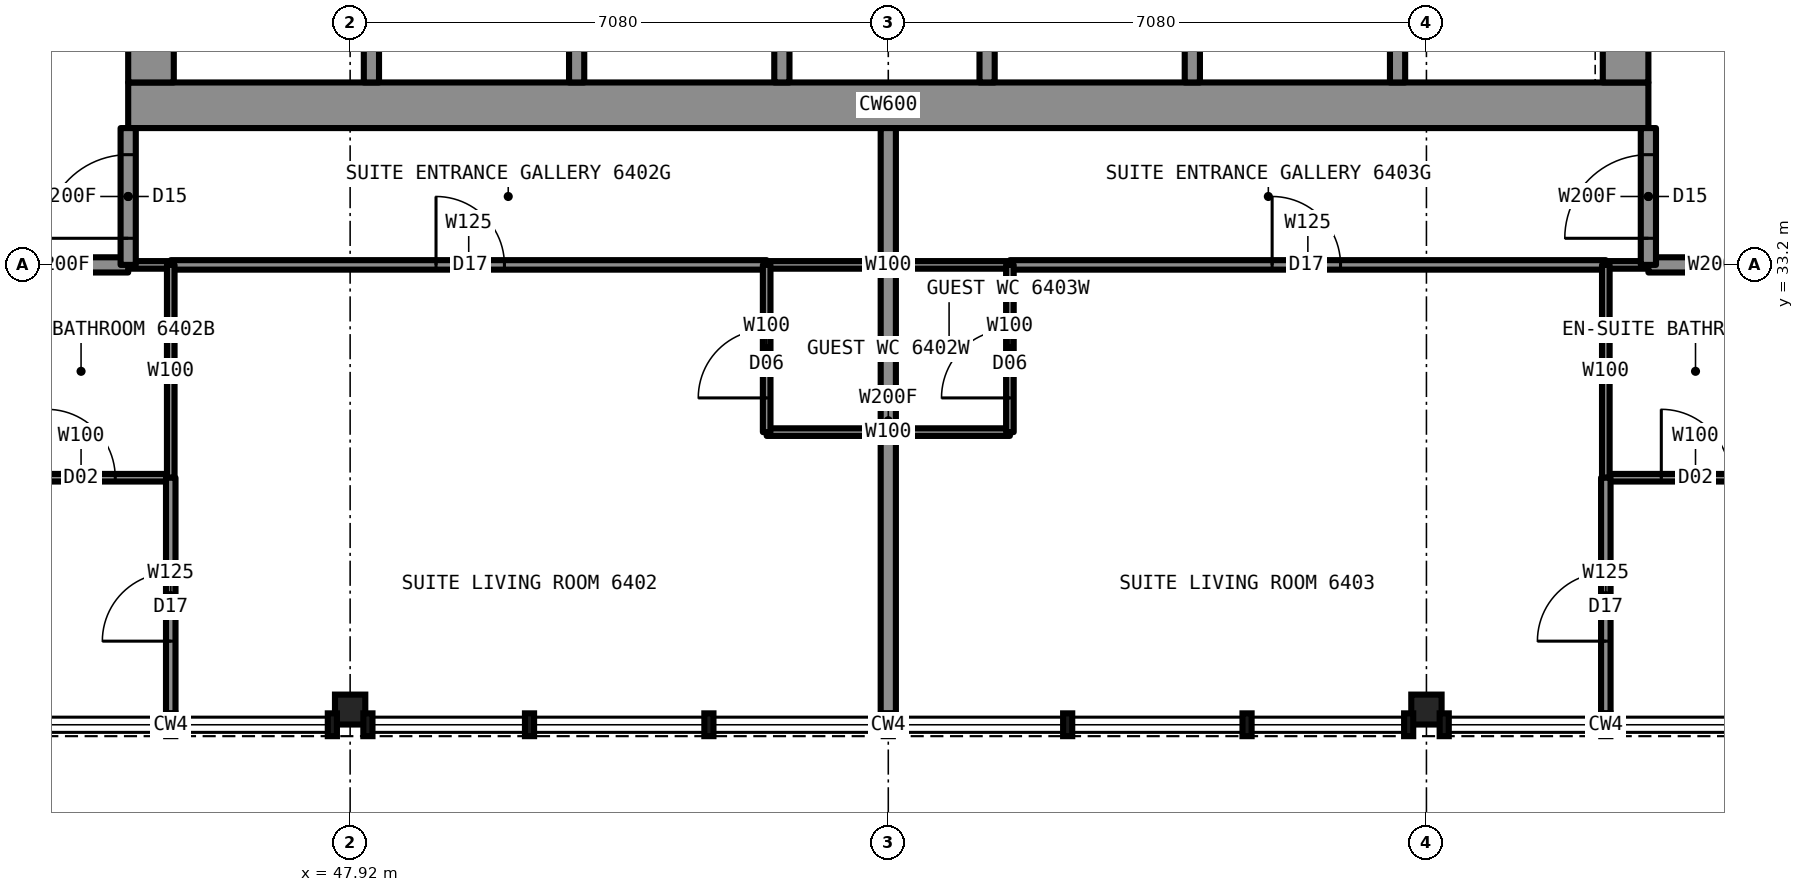
"""IFC4 building model, lengths in metres.
Left out: names, types, materials, properties, quantities, classifications, styles, units other than length and angle.
Written with IfcOpenShell. Run it as: python <this file> out.ifc"""

import sys

from ifc_helpers import new_model, si_unit, direction, frame, frame_2d, origin, origin_2d, place, context, subcontext, project, spatial, rectangle, i_section, extrude, element, fill, save


model = new_model("IFC4")
c1 = context("Model", 3, precision=1e-05, world=origin(), true_north=direction((0.0, 1.0)))
c2 = subcontext(c1, "Body", "Model", "MODEL_VIEW")
j1 = project(units=[si_unit("LENGTHUNIT", "METRE"), si_unit("PLANEANGLEUNIT", "RADIAN")], contexts=[c1])
p1 = place(None, origin())
s1 = spatial("IfcSite", under=j1, at=p1, CompositionType="ELEMENT")
p2 = place(p1, origin())
s2 = spatial("IfcBuilding", under=s1, at=p2, CompositionType="ELEMENT")
p3 = place(p2, frame((0.0, 0.0, 237.2)))
s3 = spatial("IfcBuildingStorey", under=s2, at=p3, CompositionType="ELEMENT", Elevation=237.2)
for number, where, z_axis, x_axis in (
    (1, (47.92, 27.35, 0.0), (0.0, 0.0, 1.0), (1.0, 0.0, 0.0)),
    (2, (62.08, 27.35, 0.0), (0.0, 0.0, 1.0), (1.0, 0.0, 0.0)),
):
    element("IfcColumn", number, at=place(p3, frame(where, z_axis=z_axis, x_axis=x_axis)), inside=s3, PredefinedType="COLUMN", context=c2, shape_type="SweptSolid", body=[
        extrude(i_section(OverallWidth=0.399, OverallDepth=0.394, WebThickness=0.023, FlangeThickness=0.037, at=origin_2d()), origin(), (0.0, 0.0, 1.0), 3.5),
    ])
p4 = place(p3, frame((45.0, 35.3, 0.0), z_axis=(0.0, 0.0, 1.0), x_axis=(1.0, 0.0, 0.0)))
e3 = element("IfcWall", 3, at=p4, inside=s3, PredefinedType="SHEAR", context=c2, shape_type="SweptSolid", body=[
    extrude(rectangle(XDim=20.0, YDim=0.6, at=frame_2d((10.0, 0.0))), origin(), (0.0, 0.0, 1.0), 3.5),
])
p5 = place(p3, frame((64.7, 35.6, 0.0), z_axis=(0.0, 0.0, 1.0), x_axis=(0.0, 1.0, 0.0)))
e4 = element("IfcWall", 4, at=p5, inside=s3, PredefinedType="SHEAR", context=c2, shape_type="SweptSolid", body=[
    extrude(rectangle(XDim=18.8, YDim=0.6, at=frame_2d((9.4, 0.0))), origin(), (0.0, 0.0, 1.0), 3.5),
])
p6 = place(p5, frame((13.4, 0.0, 0.0)))
e5 = element("IfcOpeningElement", 5, at=p6, cuts=e4, PredefinedType="OPENING", context=c2, shape_type="SweptSolid", body=[
    extrude(rectangle(XDim=1.8, YDim=2.2, at=frame_2d((0.9, 1.1))), frame((0.0, 0.31, 0.0), z_axis=(0.0, -1.0, 0.0), x_axis=(1.0, 0.0, 0.0)), (0.0, 0.0, 1.0), 0.62),
])
p7 = place(p5, frame((3.6, 0.0, 0.0)))
e6 = element("IfcOpeningElement", 6, at=p7, cuts=e4, PredefinedType="OPENING", context=c2, shape_type="SweptSolid", body=[
    extrude(rectangle(XDim=1.8, YDim=2.2, at=frame_2d((0.9, 1.1))), frame((0.0, 0.31, 0.0), z_axis=(0.0, -1.0, 0.0), x_axis=(1.0, 0.0, 0.0)), (0.0, 0.0, 1.0), 0.62),
])
p8 = place(p3, frame((45.3, 35.6, 0.0), z_axis=(0.0, 0.0, 1.0), x_axis=(0.0, 1.0, 0.0)))
e7 = element("IfcWall", 7, at=p8, inside=s3, PredefinedType="SHEAR", context=c2, shape_type="SweptSolid", body=[
    extrude(rectangle(XDim=18.8, YDim=0.6, at=frame_2d((9.4, 0.0))), origin(), (0.0, 0.0, 1.0), 3.5),
])
p9 = place(p8, frame((13.4, 0.0, 0.0)))
e8 = element("IfcOpeningElement", 8, at=p9, cuts=e7, PredefinedType="OPENING", context=c2, shape_type="SweptSolid", body=[
    extrude(rectangle(XDim=1.8, YDim=2.2, at=frame_2d((0.9, 1.1))), frame((0.0, 0.31, 0.0), z_axis=(0.0, -1.0, 0.0), x_axis=(1.0, 0.0, 0.0)), (0.0, 0.0, 1.0), 0.62),
])
p10 = place(p8, frame((3.6, 0.0, 0.0)))
e9 = element("IfcOpeningElement", 9, at=p10, cuts=e7, PredefinedType="OPENING", context=c2, shape_type="SweptSolid", body=[
    extrude(rectangle(XDim=1.8, YDim=2.2, at=frame_2d((0.9, 1.1))), frame((0.0, 0.31, 0.0), z_axis=(0.0, -1.0, 0.0), x_axis=(1.0, 0.0, 0.0)), (0.0, 0.0, 1.0), 0.62),
])
p11 = place(p8, frame((6.4, 0.0, 0.0)))
e10 = element("IfcOpeningElement", 10, at=p11, cuts=e7, PredefinedType="OPENING", context=c2, shape_type="SweptSolid", body=[
    extrude(rectangle(XDim=1.2, YDim=2.2, at=frame_2d((0.6, 1.1))), frame((0.0, 0.31, 0.0), z_axis=(0.0, -1.0, 0.0), x_axis=(1.0, 0.0, 0.0)), (0.0, 0.0, 1.0), 0.62),
])
p12 = place(p3, frame((45.0, 33.2, 0.0), z_axis=(0.0, 0.0, 1.0), x_axis=(1.0, 0.0, 0.0)))
e11 = element("IfcWall", 11, at=p12, inside=s3, PredefinedType="PARTITIONING", context=c2, shape_type="SweptSolid", body=[
    extrude(rectangle(XDim=0.56, YDim=0.1, at=frame_2d((0.28, 0.0))), origin(), (0.0, 0.0, 1.0), 3.33),
])
p13 = place(p3, frame((53.4, 33.2, 0.0), z_axis=(0.0, 0.0, 1.0), x_axis=(1.0, 0.0, 0.0)))
e12 = element("IfcWall", 12, at=p13, inside=s3, PredefinedType="PARTITIONING", context=c2, shape_type="SweptSolid", body=[
    extrude(rectangle(XDim=3.2, YDim=0.1, at=frame_2d((1.6, 0.0))), origin(), (0.0, 0.0, 1.0), 3.33),
])
p14 = place(p3, frame((64.44, 33.2, 0.0), z_axis=(0.0, 0.0, 1.0), x_axis=(1.0, 0.0, 0.0)))
e13 = element("IfcWall", 13, at=p14, inside=s3, PredefinedType="PARTITIONING", context=c2, shape_type="SweptSolid", body=[
    extrude(rectangle(XDim=0.56, YDim=0.1, at=frame_2d((0.28, 0.0))), origin(), (0.0, 0.0, 1.0), 3.33),
])
p15 = place(p3, frame((43.22, 33.2, 0.0), z_axis=(0.0, 0.0, 1.0), x_axis=(1.0, 0.0, 0.0)))
e14 = element("IfcWall", 14, at=p15, inside=s3, PredefinedType="PARTITIONING", context=c2, shape_type="SweptSolid", body=[
    extrude(rectangle(XDim=1.78, YDim=0.2, at=frame_2d((0.89, 0.0))), origin(), (0.0, 0.0, 1.0), 3.33),
])
p16 = place(p3, frame((65.0, 33.2, 0.0), z_axis=(0.0, 0.0, 1.0), x_axis=(1.0, 0.0, 0.0)))
e15 = element("IfcWall", 15, at=p16, inside=s3, PredefinedType="PARTITIONING", context=c2, shape_type="SweptSolid", body=[
    extrude(rectangle(XDim=1.8, YDim=0.2, at=frame_2d((0.9, 0.0))), origin(), (0.0, 0.0, 1.0), 3.33),
])
p17 = place(p3, frame((45.56, 33.2, 0.0), z_axis=(0.0, 0.0, 1.0), x_axis=(1.0, 0.0, 0.0)))
e16 = element("IfcWall", 16, at=p17, inside=s3, PredefinedType="PARTITIONING", context=c2, shape_type="SweptSolid", body=[
    extrude(rectangle(XDim=7.84, YDim=0.125, at=frame_2d((3.92, 0.0))), origin(), (0.0, 0.0, 1.0), 3.33),
])
p18 = place(p17, frame((3.49, 0.0, 0.0)))
e17 = element("IfcOpeningElement", 17, at=p18, cuts=e16, PredefinedType="OPENING", context=c2, shape_type="SweptSolid", body=[
    extrude(rectangle(XDim=0.9, YDim=2.2, at=frame_2d((0.45, 1.1))), frame((0.0, 0.073, 0.0), z_axis=(0.0, -1.0, 0.0), x_axis=(1.0, 0.0, 0.0)), (0.0, 0.0, 1.0), 0.145),
])
p19 = place(p3, frame((56.6, 33.2, 0.0), z_axis=(0.0, 0.0, 1.0), x_axis=(1.0, 0.0, 0.0)))
e18 = element("IfcWall", 18, at=p19, inside=s3, PredefinedType="PARTITIONING", context=c2, shape_type="SweptSolid", body=[
    extrude(rectangle(XDim=7.84, YDim=0.125, at=frame_2d((3.92, 0.0))), origin(), (0.0, 0.0, 1.0), 3.33),
])
p20 = place(p19, frame((3.45, 0.0, 0.0)))
e19 = element("IfcOpeningElement", 19, at=p20, cuts=e18, PredefinedType="OPENING", context=c2, shape_type="SweptSolid", body=[
    extrude(rectangle(XDim=0.9, YDim=2.2, at=frame_2d((0.45, 1.1))), frame((0.0, 0.073, 0.0), z_axis=(0.0, -1.0, 0.0), x_axis=(1.0, 0.0, 0.0)), (0.0, 0.0, 1.0), 0.145),
])
p21 = place(p3, frame((53.4, 31.0, 0.0), z_axis=(0.0, 0.0, 1.0), x_axis=(1.0, 0.0, 0.0)))
e20 = element("IfcWall", 20, at=p21, inside=s3, PredefinedType="PARTITIONING", context=c2, shape_type="SweptSolid", body=[
    extrude(rectangle(XDim=3.2, YDim=0.1, at=frame_2d((1.6, 0.0))), origin(), (0.0, 0.0, 1.0), 3.33),
])
p22 = place(p3, frame((43.2, 30.4, 0.0), z_axis=(0.0, 0.0, 1.0), x_axis=(1.0, 0.0, 0.0)))
e21 = element("IfcWall", 21, at=p22, inside=s3, PredefinedType="PARTITIONING", context=c2, shape_type="SweptSolid", body=[
    extrude(rectangle(XDim=2.36, YDim=0.1, at=frame_2d((1.18, 0.0))), origin(), (0.0, 0.0, 1.0), 3.33),
])
p23 = place(p22, frame((0.73, 0.0, 0.0)))
e22 = element("IfcOpeningElement", 22, at=p23, cuts=e21, PredefinedType="OPENING", context=c2, shape_type="SweptSolid", body=[
    extrude(rectangle(XDim=0.9, YDim=2.1, at=frame_2d((0.45, 1.05))), frame((0.0, 0.06, 0.0), z_axis=(0.0, -1.0, 0.0), x_axis=(1.0, 0.0, 0.0)), (0.0, 0.0, 1.0), 0.12),
])
p24 = place(p3, frame((64.44, 30.4, 0.0), z_axis=(0.0, 0.0, 1.0), x_axis=(1.0, 0.0, 0.0)))
e23 = element("IfcWall", 23, at=p24, inside=s3, PredefinedType="PARTITIONING", context=c2, shape_type="SweptSolid", body=[
    extrude(rectangle(XDim=2.36, YDim=0.1, at=frame_2d((1.18, 0.0))), origin(), (0.0, 0.0, 1.0), 3.33),
])
p25 = place(p24, frame((0.73, 0.0, 0.0)))
e24 = element("IfcOpeningElement", 24, at=p25, cuts=e23, PredefinedType="OPENING", context=c2, shape_type="SweptSolid", body=[
    extrude(rectangle(XDim=0.9, YDim=2.1, at=frame_2d((0.45, 1.05))), frame((0.0, 0.06, 0.0), z_axis=(0.0, -1.0, 0.0), x_axis=(1.0, 0.0, 0.0)), (0.0, 0.0, 1.0), 0.12),
])
p26 = place(p3, frame((53.4, 31.0, 0.0), z_axis=(0.0, 0.0, 1.0), x_axis=(0.0, 1.0, 0.0)))
e25 = element("IfcWall", 25, at=p26, inside=s3, PredefinedType="PARTITIONING", context=c2, shape_type="SweptSolid", body=[
    extrude(rectangle(XDim=2.2, YDim=0.1, at=frame_2d((1.1, 0.0))), origin(), (0.0, 0.0, 1.0), 3.33),
])
p27 = place(p26, frame((0.45, 0.0, 0.0)))
e26 = element("IfcOpeningElement", 26, at=p27, cuts=e25, PredefinedType="OPENING", context=c2, shape_type="SweptSolid", body=[
    extrude(rectangle(XDim=0.9, YDim=2.1, at=frame_2d((0.45, 1.05))), frame((0.0, 0.06, 0.0), z_axis=(0.0, -1.0, 0.0), x_axis=(1.0, 0.0, 0.0)), (0.0, 0.0, 1.0), 0.12),
])
p28 = place(p3, frame((45.0, 33.2, 0.0), z_axis=(0.0, 0.0, 1.0), x_axis=(0.0, 1.0, 0.0)))
e27 = element("IfcWall", 27, at=p28, inside=s3, PredefinedType="PARTITIONING", context=c2, shape_type="SweptSolid", body=[
    extrude(rectangle(XDim=1.8, YDim=0.2, at=frame_2d((0.9, 0.0))), origin(), (0.0, 0.0, 1.0), 3.33),
])
p29 = place(p28, frame((0.35, 0.0, 0.0)))
e28 = element("IfcOpeningElement", 28, at=p29, cuts=e27, PredefinedType="OPENING", context=c2, shape_type="SweptSolid", body=[
    extrude(rectangle(XDim=1.1, YDim=2.2, at=frame_2d((0.55, 1.1))), frame((0.0, 0.11, 0.0), z_axis=(0.0, -1.0, 0.0), x_axis=(1.0, 0.0, 0.0)), (0.0, 0.0, 1.0), 0.22),
])
p30 = place(p3, frame((45.56, 30.4, 0.0), z_axis=(0.0, 0.0, 1.0), x_axis=(0.0, 1.0, 0.0)))
e29 = element("IfcWall", 29, at=p30, inside=s3, PredefinedType="PARTITIONING", context=c2, shape_type="SweptSolid", body=[
    extrude(rectangle(XDim=2.8, YDim=0.1, at=frame_2d((1.4, 0.0))), origin(), (0.0, 0.0, 1.0), 3.33),
])
p31 = place(p3, frame((45.56, 27.3, 0.0), z_axis=(0.0, 0.0, 1.0), x_axis=(0.0, 1.0, 0.0)))
e30 = element("IfcWall", 30, at=p31, inside=s3, PredefinedType="PARTITIONING", context=c2, shape_type="SweptSolid", body=[
    extrude(rectangle(XDim=3.1, YDim=0.125, at=frame_2d((1.55, 0.0))), origin(), (0.0, 0.0, 1.0), 3.33),
])
p32 = place(p31, frame((0.95, 0.0, 0.0)))
e31 = element("IfcOpeningElement", 31, at=p32, cuts=e30, PredefinedType="OPENING", context=c2, shape_type="SweptSolid", body=[
    extrude(rectangle(XDim=0.9, YDim=2.2, at=frame_2d((0.45, 1.1))), frame((0.0, 0.073, 0.0), z_axis=(0.0, -1.0, 0.0), x_axis=(1.0, 0.0, 0.0)), (0.0, 0.0, 1.0), 0.145),
])
p33 = place(p3, frame((55.0, 27.3, 0.0), z_axis=(0.0, 0.0, 1.0), x_axis=(0.0, 1.0, 0.0)))
e32 = element("IfcWall", 32, at=p33, inside=s3, PredefinedType="PARTITIONING", context=c2, shape_type="SweptSolid", body=[
    extrude(rectangle(XDim=7.7, YDim=0.2, at=frame_2d((3.85, 0.0))), origin(), (0.0, 0.0, 1.0), 2.573),
])
p34 = place(p3, frame((56.6, 31.0, 0.0), z_axis=(0.0, 0.0, 1.0), x_axis=(0.0, 1.0, 0.0)))
e33 = element("IfcWall", 33, at=p34, inside=s3, PredefinedType="PARTITIONING", context=c2, shape_type="SweptSolid", body=[
    extrude(rectangle(XDim=2.2, YDim=0.1, at=frame_2d((1.1, 0.0))), origin(), (0.0, 0.0, 1.0), 3.33),
])
p35 = place(p34, frame((0.45, 0.0, 0.0)))
e34 = element("IfcOpeningElement", 34, at=p35, cuts=e33, PredefinedType="OPENING", context=c2, shape_type="SweptSolid", body=[
    extrude(rectangle(XDim=0.9, YDim=2.1, at=frame_2d((0.45, 1.05))), frame((0.0, 0.06, 0.0), z_axis=(0.0, -1.0, 0.0), x_axis=(1.0, 0.0, 0.0)), (0.0, 0.0, 1.0), 0.12),
])
p36 = place(p3, frame((65.0, 33.2, 0.0), z_axis=(0.0, 0.0, 1.0), x_axis=(0.0, 1.0, 0.0)))
e35 = element("IfcWall", 35, at=p36, inside=s3, PredefinedType="PARTITIONING", context=c2, shape_type="SweptSolid", body=[
    extrude(rectangle(XDim=1.8, YDim=0.2, at=frame_2d((0.9, 0.0))), origin(), (0.0, 0.0, 1.0), 3.33),
])
p37 = place(p36, frame((0.35, 0.0, 0.0)))
e36 = element("IfcOpeningElement", 36, at=p37, cuts=e35, PredefinedType="OPENING", context=c2, shape_type="SweptSolid", body=[
    extrude(rectangle(XDim=1.1, YDim=2.2, at=frame_2d((0.55, 1.1))), frame((0.0, 0.11, 0.0), z_axis=(0.0, -1.0, 0.0), x_axis=(1.0, 0.0, 0.0)), (0.0, 0.0, 1.0), 0.22),
])
p38 = place(p3, frame((64.44, 30.4, 0.0), z_axis=(0.0, 0.0, 1.0), x_axis=(0.0, 1.0, 0.0)))
e37 = element("IfcWall", 37, at=p38, inside=s3, PredefinedType="PARTITIONING", context=c2, shape_type="SweptSolid", body=[
    extrude(rectangle(XDim=2.8, YDim=0.1, at=frame_2d((1.4, 0.0))), origin(), (0.0, 0.0, 1.0), 3.33),
])
p39 = place(p3, frame((64.44, 27.3, 0.0), z_axis=(0.0, 0.0, 1.0), x_axis=(0.0, 1.0, 0.0)))
e38 = element("IfcWall", 38, at=p39, inside=s3, PredefinedType="PARTITIONING", context=c2, shape_type="SweptSolid", body=[
    extrude(rectangle(XDim=3.1, YDim=0.125, at=frame_2d((1.55, 0.0))), origin(), (0.0, 0.0, 1.0), 3.33),
])
p40 = place(p39, frame((0.95, 0.0, 0.0)))
e39 = element("IfcOpeningElement", 39, at=p40, cuts=e38, PredefinedType="OPENING", context=c2, shape_type="SweptSolid", body=[
    extrude(rectangle(XDim=0.9, YDim=2.2, at=frame_2d((0.45, 1.1))), frame((0.0, 0.073, 0.0), z_axis=(0.0, -1.0, 0.0), x_axis=(1.0, 0.0, 0.0)), (0.0, 0.0, 1.0), 0.145),
])
for number, where, z_axis, x_axis in (
    (40, (48.2, 35.6, 0.0), (0.0, 0.0, 1.0), (0.0, 1.0, 0.0)),
    (41, (50.9, 35.6, 0.0), (0.0, 0.0, 1.0), (0.0, 1.0, 0.0)),
    (42, (53.6, 35.6, 0.0), (0.0, 0.0, 1.0), (0.0, 1.0, 0.0)),
    (43, (56.3, 35.6, 0.0), (0.0, 0.0, 1.0), (0.0, 1.0, 0.0)),
    (44, (59.0, 35.6, 0.0), (0.0, 0.0, 1.0), (0.0, 1.0, 0.0)),
    (45, (61.7, 35.6, 0.0), (0.0, 0.0, 1.0), (0.0, 1.0, 0.0)),
):
    element("IfcWall", number, at=place(p3, frame(where, z_axis=z_axis, x_axis=x_axis)), inside=s3, PredefinedType="PARTITIONING", context=c2, shape_type="SweptSolid", body=[
        extrude(rectangle(XDim=2.7, YDim=0.2, at=frame_2d((1.35, 0.0))), origin(), (0.0, 0.0, 1.0), 3.33),
    ])
p41 = place(p18, origin())
e46 = element("IfcDoor", 46, at=p41, inside=s3, OperationType="SINGLE_SWING_LEFT", PredefinedType="DOOR", context=c2, shape_type="SweptSolid", body=[
    extrude(rectangle(XDim=0.9, YDim=2.2, at=frame_2d((0.45, 1.1))), frame((0.0, 0.025, 0.0), z_axis=(0.0, -1.0, 0.0), x_axis=(1.0, 0.0, 0.0)), (0.0, 0.0, 1.0), 0.05),
])
fill(e17, e46)
p42 = place(p23, origin())
e47 = element("IfcDoor", 47, at=p42, inside=s3, OperationType="SINGLE_SWING_RIGHT", PredefinedType="DOOR", context=c2, shape_type="SweptSolid", body=[
    extrude(rectangle(XDim=0.9, YDim=2.1, at=frame_2d((0.45, 1.05))), frame((0.0, 0.025, 0.0), z_axis=(0.0, -1.0, 0.0), x_axis=(1.0, 0.0, 0.0)), (0.0, 0.0, 1.0), 0.05),
])
fill(e22, e47)
p43 = place(p29, origin())
e48 = element("IfcDoor", 48, at=p43, inside=s3, OperationType="SINGLE_SWING_LEFT", PredefinedType="DOOR", context=c2, shape_type="SweptSolid", body=[
    extrude(rectangle(XDim=1.1, YDim=2.2, at=frame_2d((0.55, 1.1))), frame((0.0, 0.025, 0.0), z_axis=(0.0, -1.0, 0.0), x_axis=(1.0, 0.0, 0.0)), (0.0, 0.0, 1.0), 0.05),
])
fill(e28, e48)
p44 = place(p32, origin())
e49 = element("IfcDoor", 49, at=p44, inside=s3, OperationType="SINGLE_SWING_LEFT", PredefinedType="DOOR", context=c2, shape_type="SweptSolid", body=[
    extrude(rectangle(XDim=0.9, YDim=2.2, at=frame_2d((0.45, 1.1))), frame((0.0, 0.025, 0.0), z_axis=(0.0, -1.0, 0.0), x_axis=(1.0, 0.0, 0.0)), (0.0, 0.0, 1.0), 0.05),
])
fill(e31, e49)
p45 = place(p27, origin())
e50 = element("IfcDoor", 50, at=p45, inside=s3, OperationType="SINGLE_SWING_LEFT", PredefinedType="DOOR", context=c2, shape_type="SweptSolid", body=[
    extrude(rectangle(XDim=0.9, YDim=2.1, at=frame_2d((0.45, 1.05))), frame((0.0, 0.025, 0.0), z_axis=(0.0, -1.0, 0.0), x_axis=(1.0, 0.0, 0.0)), (0.0, 0.0, 1.0), 0.05),
])
fill(e26, e50)
p46 = place(p20, origin())
e51 = element("IfcDoor", 51, at=p46, inside=s3, OperationType="SINGLE_SWING_LEFT", PredefinedType="DOOR", context=c2, shape_type="SweptSolid", body=[
    extrude(rectangle(XDim=0.9, YDim=2.2, at=frame_2d((0.45, 1.1))), frame((0.0, 0.025, 0.0), z_axis=(0.0, -1.0, 0.0), x_axis=(1.0, 0.0, 0.0)), (0.0, 0.0, 1.0), 0.05),
])
fill(e19, e51)
p47 = place(p25, origin())
e52 = element("IfcDoor", 52, at=p47, inside=s3, OperationType="SINGLE_SWING_RIGHT", PredefinedType="DOOR", context=c2, shape_type="SweptSolid", body=[
    extrude(rectangle(XDim=0.9, YDim=2.1, at=frame_2d((0.45, 1.05))), frame((0.0, 0.025, 0.0), z_axis=(0.0, -1.0, 0.0), x_axis=(1.0, 0.0, 0.0)), (0.0, 0.0, 1.0), 0.05),
])
fill(e24, e52)
p48 = place(p37, origin())
e53 = element("IfcDoor", 53, at=p48, inside=s3, OperationType="SINGLE_SWING_LEFT", PredefinedType="DOOR", context=c2, shape_type="SweptSolid", body=[
    extrude(rectangle(XDim=1.1, YDim=2.2, at=frame_2d((0.55, 1.1))), frame((0.0, 0.025, 0.0), z_axis=(0.0, -1.0, 0.0), x_axis=(1.0, 0.0, 0.0)), (0.0, 0.0, 1.0), 0.05),
])
fill(e36, e53)
p49 = place(p40, origin())
e54 = element("IfcDoor", 54, at=p49, inside=s3, OperationType="SINGLE_SWING_LEFT", PredefinedType="DOOR", context=c2, shape_type="SweptSolid", body=[
    extrude(rectangle(XDim=0.9, YDim=2.2, at=frame_2d((0.45, 1.1))), frame((0.0, 0.025, 0.0), z_axis=(0.0, -1.0, 0.0), x_axis=(1.0, 0.0, 0.0)), (0.0, 0.0, 1.0), 0.05),
])
fill(e39, e54)
p50 = place(p35, origin())
e55 = element("IfcDoor", 55, at=p50, inside=s3, OperationType="SINGLE_SWING_LEFT", PredefinedType="DOOR", context=c2, shape_type="SweptSolid", body=[
    extrude(rectangle(XDim=0.9, YDim=2.1, at=frame_2d((0.45, 1.05))), frame((0.0, 0.025, 0.0), z_axis=(0.0, -1.0, 0.0), x_axis=(1.0, 0.0, 0.0)), (0.0, 0.0, 1.0), 0.05),
])
fill(e34, e55)
save(model, sys.argv[1])
